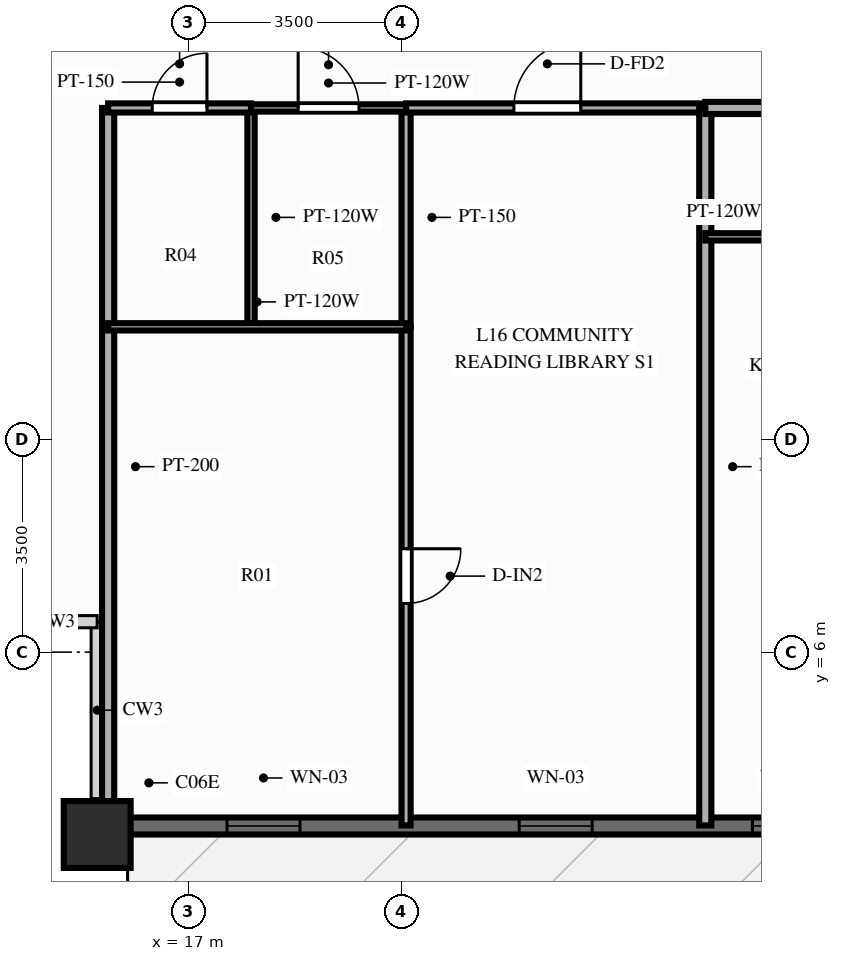
"""IFC4 building model, lengths in metres.
Left out: names, types, materials, properties, quantities, classifications, styles, units other than length and angle.
Written with IfcOpenShell. Run it as: python <this file> out.ifc"""

import sys

from ifc_helpers import new_model, si_unit, direction, frame, frame_2d, origin, origin_2d, place, context, subcontext, project, spatial, rectangle, extrude, source, transform, mapped, element, fill, save


model = new_model("IFC4")
c1 = context("Model", 3, precision=1e-05, world=origin(), true_north=direction((0.0, 1.0)))
c2 = subcontext(c1, "Body", "Model", "MODEL_VIEW")
j1 = project(units=[si_unit("LENGTHUNIT", "METRE"), si_unit("PLANEANGLEUNIT", "RADIAN")], contexts=[c1])
p1 = place(None, origin())
s1 = spatial("IfcSite", under=j1, at=p1, CompositionType="ELEMENT")
p2 = place(p1, origin())
s2 = spatial("IfcBuilding", under=s1, at=p2, CompositionType="ELEMENT")
p3 = place(p2, frame((0.0, 0.0, 52.4)))
s3 = spatial("IfcBuildingStorey", under=s2, at=p3, CompositionType="ELEMENT", Elevation=52.4)
m1 = source(origin(), c2, "Body", "SweptSolid", [
    extrude(rectangle(XDim=1.1, YDim=1.1, at=origin_2d()), origin(), (0.0, 0.0, 1.0), 3.0),
])
p4 = place(p3, frame((15.5, 3.0, 0.0), z_axis=(0.0, 0.0, 1.0), x_axis=(1.0, 0.0, 0.0)))
e1 = element("IfcColumn", 1, at=p4, inside=s3, PredefinedType="COLUMN", context=c2, shape_type="MappedRepresentation", body=[
    mapped(m1, transform((0.0, 0.0, 0.0), scale=1.0)),
])
p5 = place(p3, frame((15.5, 3.14, 0.0), z_axis=(0.0, 0.0, 1.0), x_axis=(1.0, 0.0, 0.0)))
e2 = element("IfcWall", 2, at=p5, inside=s3, PredefinedType="SOLIDWALL", context=c2, shape_type="SweptSolid", body=[
    extrude(rectangle(XDim=45.0, YDim=0.28, at=frame_2d((22.5, 0.0))), origin(), (0.0, 0.0, 1.0), 2.28),
])
p6 = place(p5, frame((2.135, 0.0, 0.25)))
e3 = element("IfcOpeningElement", 3, at=p6, cuts=e2, PredefinedType="OPENING", context=c2, shape_type="SweptSolid", body=[
    extrude(rectangle(XDim=1.2, YDim=1.5, at=frame_2d((0.6, 0.75))), frame((0.0, 0.152, 0.0), z_axis=(0.0, -1.0, 0.0), x_axis=(1.0, 0.0, 0.0)), (0.0, 0.0, 1.0), 0.304),
])
p7 = place(p5, frame((6.94, 0.0, 0.25)))
e4 = element("IfcOpeningElement", 4, at=p7, cuts=e2, PredefinedType="OPENING", context=c2, shape_type="SweptSolid", body=[
    extrude(rectangle(XDim=1.2, YDim=1.5, at=frame_2d((0.6, 0.75))), frame((0.0, 0.152, 0.0), z_axis=(0.0, -1.0, 0.0), x_axis=(1.0, 0.0, 0.0)), (0.0, 0.0, 1.0), 0.304),
])
p8 = place(p5, frame((10.776, 0.0, 0.25)))
e5 = element("IfcOpeningElement", 5, at=p8, cuts=e2, PredefinedType="OPENING", context=c2, shape_type="SweptSolid", body=[
    extrude(rectangle(XDim=1.2, YDim=1.5, at=frame_2d((0.6, 0.75))), frame((0.0, 0.152, 0.0), z_axis=(0.0, -1.0, 0.0), x_axis=(1.0, 0.0, 0.0)), (0.0, 0.0, 1.0), 0.304),
])
p9 = place(p5, frame((13.58, 0.0, 0.25)))
e6 = element("IfcOpeningElement", 6, at=p9, cuts=e2, PredefinedType="OPENING", context=c2, shape_type="SweptSolid", body=[
    extrude(rectangle(XDim=1.2, YDim=1.5, at=frame_2d((0.6, 0.75))), frame((0.0, 0.152, 0.0), z_axis=(0.0, -1.0, 0.0), x_axis=(1.0, 0.0, 0.0)), (0.0, 0.0, 1.0), 0.304),
])
p10 = place(p5, frame((17.506, 0.0, 0.25)))
e7 = element("IfcOpeningElement", 7, at=p10, cuts=e2, PredefinedType="OPENING", context=c2, shape_type="SweptSolid", body=[
    extrude(rectangle(XDim=1.2, YDim=1.5, at=frame_2d((0.6, 0.75))), frame((0.0, 0.152, 0.0), z_axis=(0.0, -1.0, 0.0), x_axis=(1.0, 0.0, 0.0)), (0.0, 0.0, 1.0), 0.304),
])
p11 = place(p5, frame((22.822, 0.0, 0.0), z_axis=(0.0, 0.0, 1.0), x_axis=(-1.0, 0.0, 0.0)))
e8 = element("IfcOpeningElement", 8, at=p11, cuts=e2, PredefinedType="OPENING", context=c2, shape_type="SweptSolid", body=[
    extrude(rectangle(XDim=1.1, YDim=2.15, at=frame_2d((0.55, 1.075))), frame((0.0, 0.152, 0.0), z_axis=(0.0, -1.0, 0.0), x_axis=(1.0, 0.0, 0.0)), (0.0, 0.0, 1.0), 0.304),
])
p12 = place(p5, frame((26.066, 0.0, 0.25)))
e9 = element("IfcOpeningElement", 9, at=p12, cuts=e2, PredefinedType="OPENING", context=c2, shape_type="SweptSolid", body=[
    extrude(rectangle(XDim=1.2, YDim=1.5, at=frame_2d((0.6, 0.75))), frame((0.0, 0.152, 0.0), z_axis=(0.0, -1.0, 0.0), x_axis=(1.0, 0.0, 0.0)), (0.0, 0.0, 1.0), 0.304),
])
p13 = place(p5, frame((30.255, 0.0, 0.25)))
e10 = element("IfcOpeningElement", 10, at=p13, cuts=e2, PredefinedType="OPENING", context=c2, shape_type="SweptSolid", body=[
    extrude(rectangle(XDim=1.2, YDim=1.5, at=frame_2d((0.6, 0.75))), frame((0.0, 0.152, 0.0), z_axis=(0.0, -1.0, 0.0), x_axis=(1.0, 0.0, 0.0)), (0.0, 0.0, 1.0), 0.304),
])
p14 = place(p5, frame((33.346, 0.0, 0.25)))
e11 = element("IfcOpeningElement", 11, at=p14, cuts=e2, PredefinedType="OPENING", context=c2, shape_type="SweptSolid", body=[
    extrude(rectangle(XDim=1.2, YDim=1.5, at=frame_2d((0.6, 0.75))), frame((0.0, 0.152, 0.0), z_axis=(0.0, -1.0, 0.0), x_axis=(1.0, 0.0, 0.0)), (0.0, 0.0, 1.0), 0.304),
])
p15 = place(p5, frame((37.821, 0.0, 0.25)))
e12 = element("IfcOpeningElement", 12, at=p15, cuts=e2, PredefinedType="OPENING", context=c2, shape_type="SweptSolid", body=[
    extrude(rectangle(XDim=1.2, YDim=1.5, at=frame_2d((0.6, 0.75))), frame((0.0, 0.152, 0.0), z_axis=(0.0, -1.0, 0.0), x_axis=(1.0, 0.0, 0.0)), (0.0, 0.0, 1.0), 0.304),
])
p16 = place(p5, frame((42.341, 0.0, 0.25)))
e13 = element("IfcOpeningElement", 13, at=p16, cuts=e2, PredefinedType="OPENING", context=c2, shape_type="SweptSolid", body=[
    extrude(rectangle(XDim=1.2, YDim=1.5, at=frame_2d((0.6, 0.75))), frame((0.0, 0.152, 0.0), z_axis=(0.0, -1.0, 0.0), x_axis=(1.0, 0.0, 0.0)), (0.0, 0.0, 1.0), 0.304),
])
p17 = place(p3, frame((15.68, 14.95, 0.0), z_axis=(0.0, 0.0, 1.0), x_axis=(0.0, -1.0, 0.0)))
e14 = element("IfcWall", 14, at=p17, inside=s3, PredefinedType="PARTITIONING", context=c2, shape_type="SweptSolid", body=[
    extrude(rectangle(XDim=11.8, YDim=0.2, at=frame_2d((5.9, 0.0))), origin(), (0.0, 0.0, 1.0), 2.79),
])
p18 = place(p3, frame((18.03, 14.95, 0.0), z_axis=(0.0, 0.0, 1.0), x_axis=(0.0, -1.0, 0.0)))
e15 = element("IfcWall", 15, at=p18, inside=s3, PredefinedType="PARTITIONING", context=c2, shape_type="SweptSolid", body=[
    extrude(rectangle(XDim=3.6, YDim=0.12, at=frame_2d((1.8, 0.0))), origin(), (0.0, 0.0, 1.0), 2.79),
])
p19 = place(p3, frame((20.58, 14.95, 0.0), z_axis=(0.0, 0.0, 1.0), x_axis=(0.0, -1.0, 0.0)))
e16 = element("IfcWall", 16, at=p19, inside=s3, PredefinedType="PARTITIONING", context=c2, shape_type="SweptSolid", body=[
    extrude(rectangle(XDim=3.6, YDim=0.15, at=frame_2d((1.8, 0.0))), origin(), (0.0, 0.0, 1.0), 2.79),
])
p20 = place(p3, frame((20.58, 11.35, 0.0), z_axis=(0.0, 0.0, 1.0), x_axis=(0.0, -1.0, 0.0)))
e17 = element("IfcWall", 17, at=p20, inside=s3, PredefinedType="PARTITIONING", context=c2, shape_type="SweptSolid", body=[
    extrude(rectangle(XDim=8.2, YDim=0.15, at=frame_2d((4.1, 0.0))), origin(), (0.0, 0.0, 1.0), 2.79),
])
p21 = place(p20, frame((3.65, 0.0, 0.0)))
e18 = element("IfcOpeningElement", 18, at=p21, cuts=e17, PredefinedType="OPENING", context=c2, shape_type="SweptSolid", body=[
    extrude(rectangle(XDim=0.9, YDim=2.1, at=frame_2d((0.45, 1.05))), frame((0.0, 0.087, 0.0), z_axis=(0.0, -1.0, 0.0), x_axis=(1.0, 0.0, 0.0)), (0.0, 0.0, 1.0), 0.174),
])
p22 = place(p3, frame((15.68, 11.35, 0.0), z_axis=(0.0, 0.0, 1.0), x_axis=(1.0, 0.0, 0.0)))
e19 = element("IfcWall", 19, at=p22, inside=s3, PredefinedType="PARTITIONING", context=c2, shape_type="SweptSolid", body=[
    extrude(rectangle(XDim=4.9, YDim=0.12, at=frame_2d((2.45, 0.0))), origin(), (0.0, 0.0, 1.0), 2.79),
])
p23 = place(p3, frame((15.68, 14.95, 0.0), z_axis=(0.0, 0.0, 1.0), x_axis=(1.0, 0.0, 0.0)))
e20 = element("IfcWall", 20, at=p23, inside=s3, PredefinedType="PARTITIONING", context=c2, shape_type="SweptSolid", body=[
    extrude(rectangle(XDim=2.35, YDim=0.15, at=frame_2d((1.175, 0.0))), origin(), (0.0, 0.0, 1.0), 2.79),
])
p24 = place(p23, frame((0.725, 0.0, 0.0)))
e21 = element("IfcOpeningElement", 21, at=p24, cuts=e20, PredefinedType="OPENING", context=c2, shape_type="SweptSolid", body=[
    extrude(rectangle(XDim=0.9, YDim=2.1, at=frame_2d((0.45, 1.05))), frame((0.0, 0.087, 0.0), z_axis=(0.0, -1.0, 0.0), x_axis=(1.0, 0.0, 0.0)), (0.0, 0.0, 1.0), 0.174),
])
p25 = place(p3, frame((18.03, 14.95, 0.0), z_axis=(0.0, 0.0, 1.0), x_axis=(1.0, 0.0, 0.0)))
e22 = element("IfcWall", 22, at=p25, inside=s3, PredefinedType="PARTITIONING", context=c2, shape_type="SweptSolid", body=[
    extrude(rectangle(XDim=2.55, YDim=0.12, at=frame_2d((1.275, 0.0))), origin(), (0.0, 0.0, 1.0), 2.79),
])
p26 = place(p25, frame((0.775, 0.0, 0.0)))
e23 = element("IfcOpeningElement", 23, at=p26, cuts=e22, PredefinedType="OPENING", context=c2, shape_type="SweptSolid", body=[
    extrude(rectangle(XDim=1.0, YDim=2.1, at=frame_2d((0.5, 1.05))), frame((0.0, 0.072, 0.0), z_axis=(0.0, -1.0, 0.0), x_axis=(1.0, 0.0, 0.0)), (0.0, 0.0, 1.0), 0.144),
])
p27 = place(p3, frame((20.58, 14.95, 0.0), z_axis=(0.0, 0.0, 1.0), x_axis=(1.0, 0.0, 0.0)))
e24 = element("IfcWall", 24, at=p27, inside=s3, PredefinedType="PARTITIONING", context=c2, shape_type="SweptSolid", body=[
    extrude(rectangle(XDim=4.921, YDim=0.15, at=frame_2d((2.46, 0.0))), origin(), (0.0, 0.0, 1.0), 2.79),
])
p28 = place(p27, frame((1.773, 0.0, 0.0)))
e25 = element("IfcOpeningElement", 25, at=p28, cuts=e24, PredefinedType="OPENING", context=c2, shape_type="SweptSolid", body=[
    extrude(rectangle(XDim=1.1, YDim=2.15, at=frame_2d((0.55, 1.075))), frame((0.0, 0.087, 0.0), z_axis=(0.0, -1.0, 0.0), x_axis=(1.0, 0.0, 0.0)), (0.0, 0.0, 1.0), 0.174),
])
p29 = place(p3, frame((25.501, 14.95, 0.0), z_axis=(0.0, 0.0, 1.0), x_axis=(0.0, -1.0, 0.0)))
e26 = element("IfcWall", 26, at=p29, inside=s3, PredefinedType="PARTITIONING", context=c2, shape_type="SweptSolid", body=[
    extrude(rectangle(XDim=11.8, YDim=0.2, at=frame_2d((5.9, 0.0))), origin(), (0.0, 0.0, 1.0), 2.79),
])
p30 = place(p3, frame((25.501, 14.95, 0.0), z_axis=(0.0, 0.0, 1.0), x_axis=(1.0, 0.0, 0.0)))
e27 = element("IfcWall", 27, at=p30, inside=s3, PredefinedType="PARTITIONING", context=c2, shape_type="SweptSolid", body=[
    extrude(rectangle(XDim=2.75, YDim=0.2, at=frame_2d((1.375, 0.0))), origin(), (0.0, 0.0, 1.0), 2.79),
])
p31 = place(p3, frame((25.501, 12.83, 0.0), z_axis=(0.0, 0.0, 1.0), x_axis=(1.0, 0.0, 0.0)))
e28 = element("IfcWall", 28, at=p31, inside=s3, PredefinedType="PARTITIONING", context=c2, shape_type="SweptSolid", body=[
    extrude(rectangle(XDim=2.75, YDim=0.12, at=frame_2d((1.375, 0.0))), origin(), (0.0, 0.0, 1.0), 2.79),
])
m2 = source(origin(), c2, "Body", "SweptSolid", [
    extrude(rectangle(XDim=1.2, YDim=1.5, at=frame_2d((0.6, 0.75))), frame((0.0, 0.03, 0.0), z_axis=(0.0, -1.0, 0.0), x_axis=(1.0, 0.0, 0.0)), (0.0, 0.0, 1.0), 0.06),
])
p32 = place(p6, origin())
e29 = element("IfcWindow", 29, at=p32, inside=s3, PartitioningType="SINGLE_PANEL", PredefinedType="WINDOW", context=c2, shape_type="MappedRepresentation", body=[
    mapped(m2, transform((0.0, 0.0, 0.0), scale=1.0)),
])
fill(e3, e29)
p33 = place(p7, origin())
e30 = element("IfcWindow", 30, at=p33, inside=s3, PartitioningType="SINGLE_PANEL", PredefinedType="WINDOW", context=c2, shape_type="MappedRepresentation", body=[
    mapped(m2, transform((0.0, 0.0, 0.0), scale=1.0)),
])
fill(e4, e30)
p34 = place(p8, origin())
e31 = element("IfcWindow", 31, at=p34, inside=s3, PartitioningType="SINGLE_PANEL", PredefinedType="WINDOW", context=c2, shape_type="MappedRepresentation", body=[
    mapped(m2, transform((0.0, 0.0, 0.0), scale=1.0)),
])
fill(e5, e31)
m3 = source(origin(), c2, "Body", "SweptSolid", [
    extrude(rectangle(XDim=0.9, YDim=2.1, at=frame_2d((0.45, 1.05))), frame((0.0, 0.025, 0.0), z_axis=(0.0, -1.0, 0.0), x_axis=(1.0, 0.0, 0.0)), (0.0, 0.0, 1.0), 0.05),
])
p35 = place(p21, origin())
e32 = element("IfcDoor", 32, at=p35, inside=s3, OperationType="SINGLE_SWING_LEFT", PredefinedType="DOOR", context=c2, shape_type="MappedRepresentation", body=[
    mapped(m3, transform((0.0, 0.0, 0.0), scale=1.0)),
])
fill(e18, e32)
p36 = place(p24, origin())
e33 = element("IfcDoor", 33, at=p36, inside=s3, OperationType="SINGLE_SWING_RIGHT", PredefinedType="DOOR", context=c2, shape_type="MappedRepresentation", body=[
    mapped(m3, transform((0.0, 0.0, 0.0), scale=1.0)),
])
fill(e21, e33)
m4 = source(origin(), c2, "Body", "SweptSolid", [
    extrude(rectangle(XDim=1.0, YDim=2.1, at=frame_2d((0.5, 1.05))), frame((0.0, 0.025, 0.0), z_axis=(0.0, -1.0, 0.0), x_axis=(1.0, 0.0, 0.0)), (0.0, 0.0, 1.0), 0.05),
])
p37 = place(p26, origin())
e34 = element("IfcDoor", 34, at=p37, inside=s3, OperationType="SINGLE_SWING_LEFT", PredefinedType="DOOR", context=c2, shape_type="MappedRepresentation", body=[
    mapped(m4, transform((0.0, 0.0, 0.0), scale=1.0)),
])
fill(e23, e34)
m5 = source(origin(), c2, "Body", "SweptSolid", [
    extrude(rectangle(XDim=1.1, YDim=2.15, at=frame_2d((0.55, 1.075))), frame((0.0, 0.025, 0.0), z_axis=(0.0, -1.0, 0.0), x_axis=(1.0, 0.0, 0.0)), (0.0, 0.0, 1.0), 0.05),
])
p38 = place(p28, origin())
e35 = element("IfcDoor", 35, at=p38, inside=s3, OperationType="SINGLE_SWING_RIGHT", PredefinedType="DOOR", context=c2, shape_type="MappedRepresentation", body=[
    mapped(m5, transform((0.0, 0.0, 0.0), scale=1.0)),
])
fill(e25, e35)
save(model, sys.argv[1])
